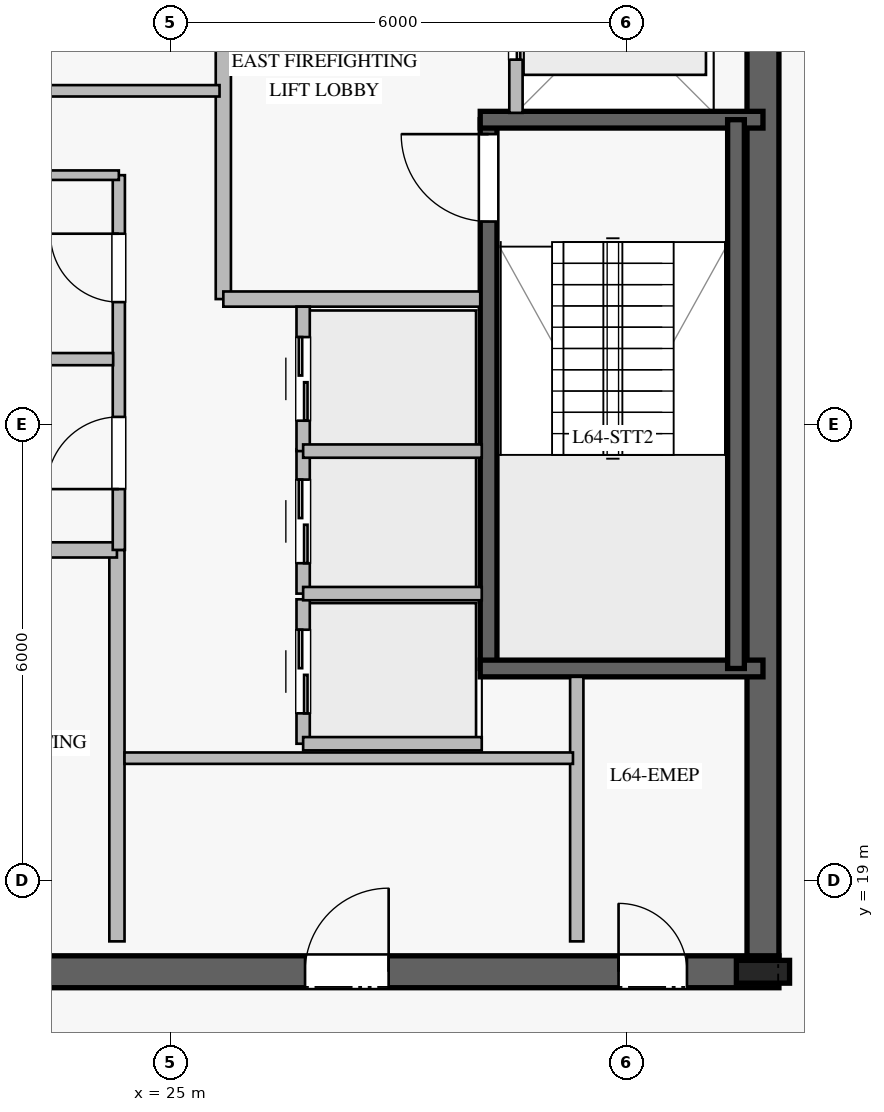
"""IFC4 building model, lengths in metres.
Left out: names, types, materials, properties, quantities, classifications, styles, units other than length and angle.
Written with IfcOpenShell. Run it as: python <this file> out.ifc"""

import sys

from ifc_helpers import new_model, si_unit, direction, frame, frame_2d, origin, origin_2d, place, context, subcontext, project, spatial, rectangle, i_section, extrude, element, fill, save


model = new_model("IFC4")
c1 = context("Model", 3, precision=1e-05, world=origin(), true_north=direction((0.0, 1.0)))
c2 = subcontext(c1, "Body", "Model", "MODEL_VIEW")
j1 = project(units=[si_unit("LENGTHUNIT", "METRE"), si_unit("PLANEANGLEUNIT", "RADIAN")], contexts=[c1])
p1 = place(None, origin())
s1 = spatial("IfcSite", under=j1, at=p1, CompositionType="ELEMENT")
p2 = place(p1, origin())
s2 = spatial("IfcBuilding", under=s1, at=p2, CompositionType="ELEMENT")
p3 = place(p2, frame((0.0, 0.0, 266.2)))
s3 = spatial("IfcBuildingStorey", under=s2, at=p3, CompositionType="ELEMENT", Elevation=266.2)
p4 = place(p3, frame((16.99, 17.8, 0.0), z_axis=(0.0, 0.0, 1.0), x_axis=(1.0, 0.0, 0.0)))
e1 = element("IfcWall", 1, at=p4, inside=s3, PredefinedType="SHEAR", context=c2, shape_type="SweptSolid", body=[
    extrude(rectangle(XDim=16.02, YDim=0.42, at=frame_2d((8.01, 0.0))), origin(), (0.0, 0.0, 1.0), 3.78),
])
p5 = place(p4, frame((4.96, 0.0, 0.0)))
e2 = element("IfcOpeningElement", 2, at=p5, cuts=e1, PredefinedType="OPENING", context=c2, shape_type="SweptSolid", body=[
    extrude(rectangle(XDim=1.2, YDim=2.25, at=frame_2d((0.6, 1.125))), frame((0.0, 0.22, 0.0), z_axis=(0.0, -1.0, 0.0), x_axis=(1.0, 0.0, 0.0)), (0.0, 0.0, 1.0), 0.44),
])
p6 = place(p4, frame((13.91, 0.0, 0.0)))
e3 = element("IfcOpeningElement", 3, at=p6, cuts=e1, PredefinedType="OPENING", context=c2, shape_type="SweptSolid", body=[
    extrude(rectangle(XDim=0.9, YDim=2.1, at=frame_2d((0.45, 1.05))), frame((0.0, 0.22, 0.0), z_axis=(0.0, -1.0, 0.0), x_axis=(1.0, 0.0, 0.0)), (0.0, 0.0, 1.0), 0.44),
])
p7 = place(p4, frame((9.785, 0.0, 0.0)))
e4 = element("IfcOpeningElement", 4, at=p7, cuts=e1, PredefinedType="OPENING", context=c2, shape_type="SweptSolid", body=[
    extrude(rectangle(XDim=1.1, YDim=2.2, at=frame_2d((0.55, 1.1))), frame((0.0, 0.22, 0.0), z_axis=(0.0, -1.0, 0.0), x_axis=(1.0, 0.0, 0.0)), (0.0, 0.0, 1.0), 0.44),
])
p8 = place(p3, frame((32.8, 18.01, 0.0), z_axis=(0.0, 0.0, 1.0), x_axis=(0.0, 1.0, 0.0)))
e5 = element("IfcWall", 5, at=p8, inside=s3, PredefinedType="SHEAR", context=c2, shape_type="SweptSolid", body=[
    extrude(rectangle(XDim=13.98, YDim=0.42, at=frame_2d((6.99, 0.0))), origin(), (0.0, 0.0, 1.0), 3.78),
])
p9 = place(p3, frame((32.8, 17.8, 0.0), z_axis=(0.0, 0.0, 1.0), x_axis=(1.0, 0.0, 0.0)))
e6 = element("IfcColumn", 6, at=p9, inside=s3, PredefinedType="COLUMN", context=c2, shape_type="SweptSolid", body=[
    extrude(i_section(OverallWidth=0.3, OverallDepth=0.7, WebThickness=0.017, FlangeThickness=0.032, at=origin_2d()), origin(), (0.0, 0.0, 1.0), 4.0),
])
p10 = place(p3, frame((29.19, 21.79, 0.0), z_axis=(0.0, 0.0, 1.0), x_axis=(0.0, 1.0, 0.0)))
e7 = element("IfcWall", 7, at=p10, inside=s3, PredefinedType="SOLIDWALL", context=c2, shape_type="SweptSolid", body=[
    extrude(rectangle(XDim=7.22, YDim=0.22, at=frame_2d((3.61, 0.0))), origin(), (0.0, 0.0, 1.0), 3.78),
])
p11 = place(p10, frame((5.88, 0.0, 0.0)))
e8 = element("IfcOpeningElement", 8, at=p11, cuts=e7, PredefinedType="OPENING", context=c2, shape_type="SweptSolid", body=[
    extrude(rectangle(XDim=1.15, YDim=2.2, at=frame_2d((0.575, 1.1))), frame((0.0, 0.12, 0.0), z_axis=(0.0, -1.0, 0.0), x_axis=(1.0, 0.0, 0.0)), (0.0, 0.0, 1.0), 0.24),
])
for number, where, z_axis, x_axis in (
    (9, (29.08, 21.79, 0.0), (0.0, 0.0, 1.0), (1.0, 0.0, 0.0)),
    (10, (29.08, 29.01, 0.0), (0.0, 0.0, 1.0), (1.0, 0.0, 0.0)),
):
    element("IfcWall", number, at=place(p3, frame(where, z_axis=z_axis, x_axis=x_axis)), inside=s3, PredefinedType="SOLIDWALL", context=c2, shape_type="SweptSolid", body=[
        extrude(rectangle(XDim=3.72, YDim=0.22, at=frame_2d((1.86, 0.0))), origin(), (0.0, 0.0, 1.0), 3.78),
    ])
p12 = place(p3, frame((32.445, 29.01, 0.0), z_axis=(0.0, 0.0, 1.0), x_axis=(0.0, -1.0, 0.0)))
e11 = element("IfcWall", 11, at=p12, inside=s3, PredefinedType="SOLIDWALL", context=c2, shape_type="SweptSolid", body=[
    extrude(rectangle(XDim=7.22, YDim=0.22, at=frame_2d((3.61, 0.0))), origin(), (0.0, 0.0, 1.0), 3.78),
])
p13 = place(p3, frame((24.3, 18.2, 0.0), z_axis=(0.0, 0.0, 1.0), x_axis=(0.0, 1.0, 0.0)))
e12 = element("IfcWall", 12, at=p13, inside=s3, PredefinedType="PARTITIONING", context=c2, shape_type="SweptSolid", body=[
    extrude(rectangle(XDim=5.15, YDim=0.2, at=frame_2d((2.575, 0.0))), origin(), (0.0, 0.0, 1.0), 3.78),
])
p14 = place(p3, frame((20.92, 23.35, 0.0), z_axis=(0.0, 0.0, 1.0), x_axis=(1.0, 0.0, 0.0)))
e13 = element("IfcWall", 13, at=p14, inside=s3, PredefinedType="PARTITIONING", context=c2, shape_type="SweptSolid", body=[
    extrude(rectangle(XDim=3.38, YDim=0.2, at=frame_2d((1.69, 0.0))), origin(), (0.0, 0.0, 1.0), 3.78),
])
p15 = place(p3, frame((25.7, 26.65, 0.0), z_axis=(0.0, 0.0, 1.0), x_axis=(0.0, 1.0, 0.0)))
e14 = element("IfcWall", 14, at=p15, inside=s3, PredefinedType="PARTITIONING", context=c2, shape_type="SweptSolid", body=[
    extrude(rectangle(XDim=5.15, YDim=0.2, at=frame_2d((2.575, 0.0))), origin(), (0.0, 0.0, 1.0), 3.78),
])
p16 = place(p3, frame((25.7, 26.65, 0.0), z_axis=(0.0, 0.0, 1.0), x_axis=(1.0, 0.0, 0.0)))
e15 = element("IfcWall", 15, at=p16, inside=s3, PredefinedType="PARTITIONING", context=c2, shape_type="SweptSolid", body=[
    extrude(rectangle(XDim=3.38, YDim=0.2, at=frame_2d((1.69, 0.0))), origin(), (0.0, 0.0, 1.0), 3.78),
])
p17 = place(p3, frame((24.325, 23.35, 0.0), z_axis=(0.0, 0.0, 1.0), x_axis=(0.0, 1.0, 0.0)))
e16 = element("IfcWall", 16, at=p17, inside=s3, PredefinedType="PLUMBINGWALL", context=c2, shape_type="SweptSolid", body=[
    extrude(rectangle(XDim=4.93, YDim=0.16, at=frame_2d((2.465, 0.0))), origin(), (0.0, 0.0, 1.0), 3.78),
])
p18 = place(p17, frame((0.8, 0.0, 0.0)))
e17 = element("IfcOpeningElement", 17, at=p18, cuts=e16, PredefinedType="OPENING", context=c2, shape_type="SweptSolid", body=[
    extrude(rectangle(XDim=0.95, YDim=2.1, at=frame_2d((0.475, 1.05))), frame((0.0, 0.09, 0.0), z_axis=(0.0, -1.0, 0.0), x_axis=(1.0, 0.0, 0.0)), (0.0, 0.0, 1.0), 0.18),
])
p19 = place(p17, frame((3.26, 0.0, 0.0)))
e18 = element("IfcOpeningElement", 18, at=p19, cuts=e16, PredefinedType="OPENING", context=c2, shape_type="SweptSolid", body=[
    extrude(rectangle(XDim=0.9, YDim=2.1, at=frame_2d((0.45, 1.05))), frame((0.0, 0.09, 0.0), z_axis=(0.0, -1.0, 0.0), x_axis=(1.0, 0.0, 0.0)), (0.0, 0.0, 1.0), 0.18),
])
p20 = place(p3, frame((20.92, 28.28, 0.0), z_axis=(0.0, 0.0, 1.0), x_axis=(1.0, 0.0, 0.0)))
e19 = element("IfcWall", 19, at=p20, inside=s3, PredefinedType="PARTITIONING", context=c2, shape_type="SweptSolid", body=[
    extrude(rectangle(XDim=3.405, YDim=0.125, at=frame_2d((1.703, 0.0))), origin(), (0.0, 0.0, 1.0), 3.78),
])
p21 = place(p3, frame((20.95, 25.86, 0.0), z_axis=(0.0, 0.0, 1.0), x_axis=(1.0, 0.0, 0.0)))
e20 = element("IfcWall", 20, at=p21, inside=s3, PredefinedType="PLUMBINGWALL", context=c2, shape_type="SweptSolid", body=[
    extrude(rectangle(XDim=3.3, YDim=0.16, at=frame_2d((1.65, 0.0))), origin(), (0.0, 0.0, 1.0), 3.78),
])
p22 = place(p3, frame((30.35, 18.2, 0.0), z_axis=(0.0, 0.0, 1.0), x_axis=(0.0, 1.0, 0.0)))
e21 = element("IfcWall", 21, at=p22, inside=s3, PredefinedType="PARTITIONING", context=c2, shape_type="SweptSolid", body=[
    extrude(rectangle(XDim=3.48, YDim=0.175, at=frame_2d((1.74, 0.0))), origin(), (0.0, 0.0, 1.0), 3.78),
])
p23 = place(p3, frame((24.4, 20.61, 0.0), z_axis=(0.0, 0.0, 1.0), x_axis=(1.0, 0.0, 0.0)))
e22 = element("IfcWall", 22, at=p23, inside=s3, PredefinedType="PARTITIONING", context=c2, shape_type="SweptSolid", body=[
    extrude(rectangle(XDim=5.9, YDim=0.15, at=frame_2d((2.95, 0.0))), origin(), (0.0, 0.0, 1.0), 3.78),
])
p24 = place(p3, frame((19.75, 29.39, 0.0), z_axis=(0.0, 0.0, 1.0), x_axis=(1.0, 0.0, 0.0)))
e23 = element("IfcWall", 23, at=p24, inside=s3, PredefinedType="PARTITIONING", context=c2, shape_type="SweptSolid", body=[
    extrude(rectangle(XDim=5.9, YDim=0.15, at=frame_2d((2.95, 0.0))), origin(), (0.0, 0.0, 1.0), 3.78),
])
p25 = place(p3, frame((26.75, 20.8, 0.0), z_axis=(0.0, 0.0, 1.0), x_axis=(0.0, 1.0, 0.0)))
e24 = element("IfcWall", 24, at=p25, inside=s3, PredefinedType="PARTITIONING", context=c2, shape_type="SweptSolid", body=[
    extrude(rectangle(XDim=1.9, YDim=0.175, at=frame_2d((0.95, 0.0))), origin(), (0.0, 0.0, 1.0), 3.78),
])
p26 = place(p25, frame((0.4, 0.0, 0.0)))
e25 = element("IfcOpeningElement", 25, at=p26, cuts=e24, PredefinedType="OPENING", context=c2, shape_type="SweptSolid", body=[
    extrude(rectangle(XDim=1.1, YDim=2.2, at=frame_2d((0.55, 1.1))), frame((0.0, 0.098, 0.0), z_axis=(0.0, -1.0, 0.0), x_axis=(1.0, 0.0, 0.0)), (0.0, 0.0, 1.0), 0.195),
])
p27 = place(p3, frame((26.75, 20.8, 0.0), z_axis=(0.0, 0.0, 1.0), x_axis=(1.0, 0.0, 0.0)))
e26 = element("IfcWall", 26, at=p27, inside=s3, PredefinedType="PARTITIONING", context=c2, shape_type="SweptSolid", body=[
    extrude(rectangle(XDim=2.35, YDim=0.175, at=frame_2d((1.175, 0.0))), origin(), (0.0, 0.0, 1.0), 3.78),
])
p28 = place(p3, frame((26.75, 22.775, 0.0), z_axis=(0.0, 0.0, 1.0), x_axis=(0.0, 1.0, 0.0)))
e27 = element("IfcWall", 27, at=p28, inside=s3, PredefinedType="PARTITIONING", context=c2, shape_type="SweptSolid", body=[
    extrude(rectangle(XDim=1.9, YDim=0.175, at=frame_2d((0.95, 0.0))), origin(), (0.0, 0.0, 1.0), 3.78),
])
p29 = place(p28, frame((0.4, 0.0, 0.0)))
e28 = element("IfcOpeningElement", 28, at=p29, cuts=e27, PredefinedType="OPENING", context=c2, shape_type="SweptSolid", body=[
    extrude(rectangle(XDim=1.1, YDim=2.2, at=frame_2d((0.55, 1.1))), frame((0.0, 0.098, 0.0), z_axis=(0.0, -1.0, 0.0), x_axis=(1.0, 0.0, 0.0)), (0.0, 0.0, 1.0), 0.195),
])
p30 = place(p3, frame((26.75, 22.775, 0.0), z_axis=(0.0, 0.0, 1.0), x_axis=(1.0, 0.0, 0.0)))
e29 = element("IfcWall", 29, at=p30, inside=s3, PredefinedType="PARTITIONING", context=c2, shape_type="SweptSolid", body=[
    extrude(rectangle(XDim=2.35, YDim=0.175, at=frame_2d((1.175, 0.0))), origin(), (0.0, 0.0, 1.0), 3.78),
])
p31 = place(p3, frame((26.75, 24.65, 0.0), z_axis=(0.0, 0.0, 1.0), x_axis=(0.0, 1.0, 0.0)))
e30 = element("IfcWall", 30, at=p31, inside=s3, PredefinedType="PARTITIONING", context=c2, shape_type="SweptSolid", body=[
    extrude(rectangle(XDim=1.9, YDim=0.175, at=frame_2d((0.95, 0.0))), origin(), (0.0, 0.0, 1.0), 3.78),
])
p32 = place(p31, frame((0.4, 0.0, 0.0)))
e31 = element("IfcOpeningElement", 31, at=p32, cuts=e30, PredefinedType="OPENING", context=c2, shape_type="SweptSolid", body=[
    extrude(rectangle(XDim=1.1, YDim=2.2, at=frame_2d((0.55, 1.1))), frame((0.0, 0.098, 0.0), z_axis=(0.0, -1.0, 0.0), x_axis=(1.0, 0.0, 0.0)), (0.0, 0.0, 1.0), 0.195),
])
p33 = place(p3, frame((26.75, 24.65, 0.0), z_axis=(0.0, 0.0, 1.0), x_axis=(1.0, 0.0, 0.0)))
e32 = element("IfcWall", 32, at=p33, inside=s3, PredefinedType="PARTITIONING", context=c2, shape_type="SweptSolid", body=[
    extrude(rectangle(XDim=2.35, YDim=0.175, at=frame_2d((1.175, 0.0))), origin(), (0.0, 0.0, 1.0), 3.78),
])
p34 = place(p3, frame((29.55, 29.1, 0.0), z_axis=(0.0, 0.0, 1.0), x_axis=(0.0, 1.0, 0.0)))
e33 = element("IfcWall", 33, at=p34, inside=s3, PredefinedType="PARTITIONING", context=c2, shape_type="SweptSolid", body=[
    extrude(rectangle(XDim=2.6, YDim=0.175, at=frame_2d((1.3, 0.0))), origin(), (0.0, 0.0, 1.0), 3.78),
])
p35 = place(p34, frame((0.7, 0.0, 0.0)))
e34 = element("IfcOpeningElement", 34, at=p35, cuts=e33, PredefinedType="OPENING", context=c2, shape_type="SweptSolid", body=[
    extrude(rectangle(XDim=1.2, YDim=2.2, at=frame_2d((0.6, 1.1))), frame((0.0, 0.098, 0.0), z_axis=(0.0, -1.0, 0.0), x_axis=(1.0, 0.0, 0.0)), (0.0, 0.0, 1.0), 0.195),
])
p36 = place(p11, origin())
e35 = element("IfcDoor", 35, at=p36, inside=s3, OperationType="SINGLE_SWING_RIGHT", PredefinedType="DOOR", context=c2, shape_type="SweptSolid", body=[
    extrude(rectangle(XDim=1.15, YDim=2.2, at=frame_2d((0.575, 1.1))), frame((0.0, 0.025, 0.0), z_axis=(0.0, -1.0, 0.0), x_axis=(1.0, 0.0, 0.0)), (0.0, 0.0, 1.0), 0.05),
])
fill(e8, e35)
p37 = place(p18, origin())
e36 = element("IfcDoor", 36, at=p37, inside=s3, OperationType="SINGLE_SWING_LEFT", PredefinedType="DOOR", context=c2, shape_type="SweptSolid", body=[
    extrude(rectangle(XDim=0.95, YDim=2.1, at=frame_2d((0.475, 1.05))), frame((0.0, 0.025, 0.0), z_axis=(0.0, -1.0, 0.0), x_axis=(1.0, 0.0, 0.0)), (0.0, 0.0, 1.0), 0.05),
])
fill(e17, e36)
p38 = place(p19, origin())
e37 = element("IfcDoor", 37, at=p38, inside=s3, OperationType="SINGLE_SWING_RIGHT", PredefinedType="DOOR", context=c2, shape_type="SweptSolid", body=[
    extrude(rectangle(XDim=0.9, YDim=2.1, at=frame_2d((0.45, 1.05))), frame((0.0, 0.025, 0.0), z_axis=(0.0, -1.0, 0.0), x_axis=(1.0, 0.0, 0.0)), (0.0, 0.0, 1.0), 0.05),
])
fill(e18, e37)
p39 = place(p6, origin())
e38 = element("IfcDoor", 38, at=p39, inside=s3, OperationType="SINGLE_SWING_LEFT", PredefinedType="DOOR", context=c2, shape_type="SweptSolid", body=[
    extrude(rectangle(XDim=0.9, YDim=2.1, at=frame_2d((0.45, 1.05))), frame((0.0, 0.025, 0.0), z_axis=(0.0, -1.0, 0.0), x_axis=(1.0, 0.0, 0.0)), (0.0, 0.0, 1.0), 0.05),
])
fill(e3, e38)
p40 = place(p7, origin())
e39 = element("IfcDoor", 39, at=p40, inside=s3, OperationType="SINGLE_SWING_RIGHT", PredefinedType="DOOR", context=c2, shape_type="SweptSolid", body=[
    extrude(rectangle(XDim=1.1, YDim=2.2, at=frame_2d((0.55, 1.1))), frame((0.0, 0.025, 0.0), z_axis=(0.0, -1.0, 0.0), x_axis=(1.0, 0.0, 0.0)), (0.0, 0.0, 1.0), 0.05),
])
fill(e4, e39)
p41 = place(p26, origin())
e40 = element("IfcDoor", 40, at=p41, inside=s3, OperationType="DOUBLE_DOOR_SLIDING", PredefinedType="DOOR", context=c2, shape_type="SweptSolid", body=[
    extrude(rectangle(XDim=1.1, YDim=2.2, at=frame_2d((0.55, 1.1))), frame((0.0, 0.025, 0.0), z_axis=(0.0, -1.0, 0.0), x_axis=(1.0, 0.0, 0.0)), (0.0, 0.0, 1.0), 0.05),
])
fill(e25, e40)
p42 = place(p29, origin())
e41 = element("IfcDoor", 41, at=p42, inside=s3, OperationType="DOUBLE_DOOR_SLIDING", PredefinedType="DOOR", context=c2, shape_type="SweptSolid", body=[
    extrude(rectangle(XDim=1.1, YDim=2.2, at=frame_2d((0.55, 1.1))), frame((0.0, 0.025, 0.0), z_axis=(0.0, -1.0, 0.0), x_axis=(1.0, 0.0, 0.0)), (0.0, 0.0, 1.0), 0.05),
])
fill(e28, e41)
p43 = place(p32, origin())
e42 = element("IfcDoor", 42, at=p43, inside=s3, OperationType="DOUBLE_DOOR_SLIDING", PredefinedType="DOOR", context=c2, shape_type="SweptSolid", body=[
    extrude(rectangle(XDim=1.1, YDim=2.2, at=frame_2d((0.55, 1.1))), frame((0.0, 0.025, 0.0), z_axis=(0.0, -1.0, 0.0), x_axis=(1.0, 0.0, 0.0)), (0.0, 0.0, 1.0), 0.05),
])
fill(e31, e42)
p44 = place(p35, origin())
e43 = element("IfcDoor", 43, at=p44, inside=s3, OperationType="DOUBLE_DOOR_SLIDING", PredefinedType="DOOR", context=c2, shape_type="SweptSolid", body=[
    extrude(rectangle(XDim=1.2, YDim=2.2, at=frame_2d((0.6, 1.1))), frame((0.0, 0.025, 0.0), z_axis=(0.0, -1.0, 0.0), x_axis=(1.0, 0.0, 0.0)), (0.0, 0.0, 1.0), 0.05),
])
fill(e34, e43)
save(model, sys.argv[1])
